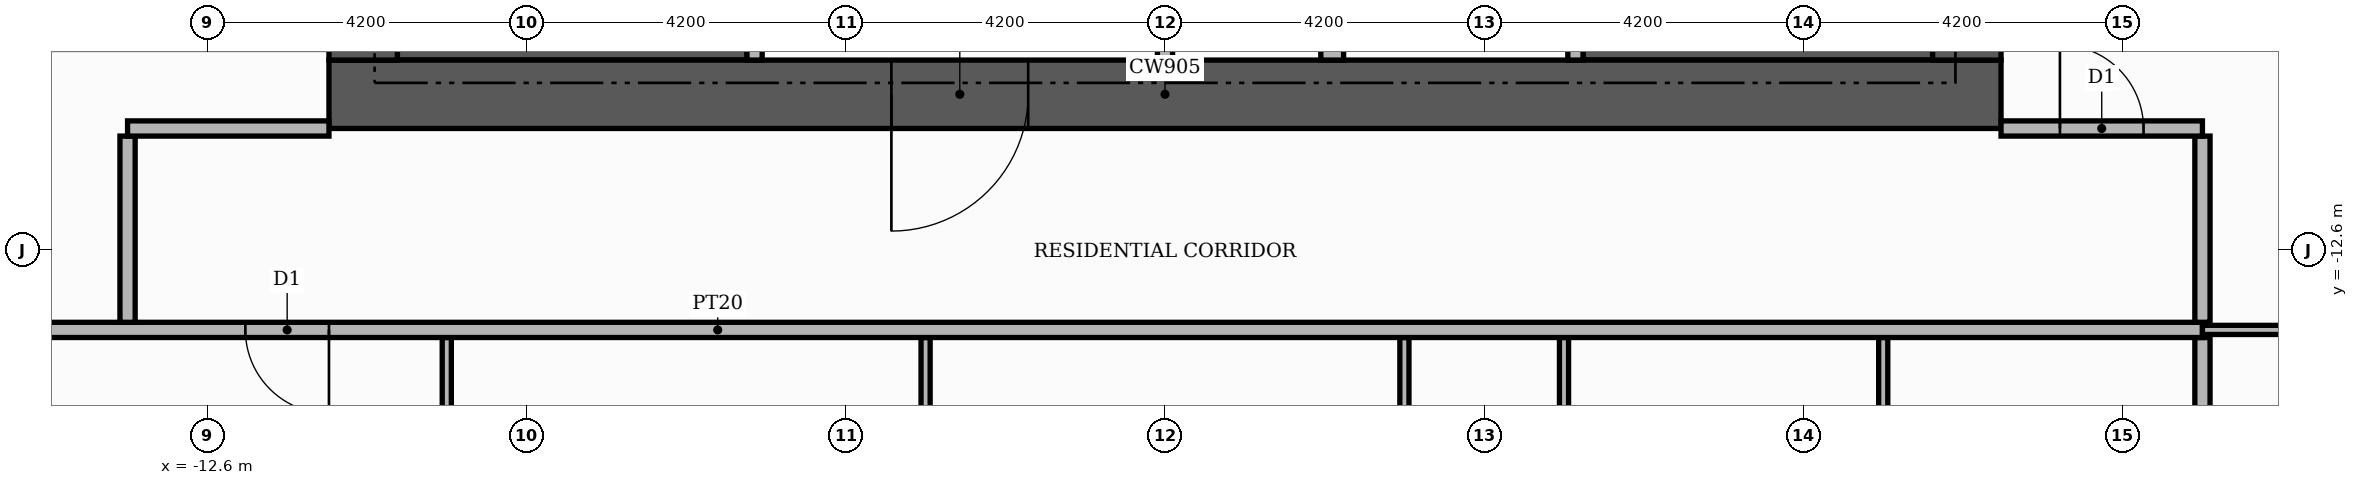
"""IFC4 building model, lengths in metres.
Left out: names, types, materials, properties, quantities, classifications, styles, units other than length and angle.
Written with IfcOpenShell. Run it as: python <this file> out.ifc"""

import sys

from ifc_helpers import new_model, si_unit, direction, frame, frame_2d, origin, place, context, subcontext, project, spatial, rectangle, extrude, element, fill, save


model = new_model("IFC4")
c1 = context("Model", 3, precision=1e-05, world=origin(), true_north=direction((0.0, 1.0)))
c2 = subcontext(c1, "Body", "Model", "MODEL_VIEW")
j1 = project(units=[si_unit("LENGTHUNIT", "METRE"), si_unit("PLANEANGLEUNIT", "RADIAN")], contexts=[c1])
p1 = place(None, origin())
s1 = spatial("IfcSite", under=j1, at=p1, CompositionType="ELEMENT")
p2 = place(p1, origin())
s2 = spatial("IfcBuilding", under=s1, at=p2, CompositionType="ELEMENT")
p3 = place(p2, frame((0.0, 0.0, 244.5)))
s3 = spatial("IfcBuildingStorey", under=s2, at=p3, CompositionType="ELEMENT", Elevation=244.5)
for number, where, z_axis, x_axis in (
    (1, (-10.1, -9.15, 0.0), (0.0, 0.0, 1.0), (1.0, 0.0, 0.0)),
    (2, (5.5, -9.15, 0.0), (0.0, 0.0, 1.0), (1.0, 0.0, 0.0)),
):
    element("IfcWall", number, at=place(p3, frame(where, z_axis=z_axis, x_axis=x_axis)), inside=s3, PredefinedType="SHEAR", context=c2, shape_type="SweptSolid", body=[
        extrude(rectangle(XDim=4.6, YDim=1.9, at=frame_2d((2.3, 0.0))), origin(), (0.0, 0.0, 1.0), 3.48),
    ])
p4 = place(p3, frame((-11.0, -10.55, 0.0), z_axis=(0.0, 0.0, 1.0), x_axis=(1.0, 0.0, 0.0)))
e3 = element("IfcWall", 3, at=p4, inside=s3, PredefinedType="SHEAR", context=c2, shape_type="SweptSolid", body=[
    extrude(rectangle(XDim=22.0, YDim=0.9, at=frame_2d((11.0, 0.0))), origin(), (0.0, 0.0, 1.0), 3.48),
])
p5 = place(p4, frame((7.4, 0.0, 0.0)))
e4 = element("IfcOpeningElement", 4, at=p5, cuts=e3, PredefinedType="OPENING", context=c2, shape_type="SweptSolid", body=[
    extrude(rectangle(XDim=1.8, YDim=2.2, at=frame_2d((0.9, 1.1))), frame((0.0, 0.46, 0.0), z_axis=(0.0, -1.0, 0.0), x_axis=(1.0, 0.0, 0.0)), (0.0, 0.0, 1.0), 0.92),
])
for number, where, z_axis, x_axis in (
    (5, (-10.55, -10.1, 0.0), (0.0, 0.0, 1.0), (0.0, 1.0, 0.0)),
    (6, (10.55, -10.1, 0.0), (0.0, 0.0, 1.0), (0.0, 1.0, 0.0)),
):
    element("IfcWall", number, at=place(p3, frame(where, z_axis=z_axis, x_axis=x_axis)), inside=s3, PredefinedType="SHEAR", context=c2, shape_type="SweptSolid", body=[
        extrude(rectangle(XDim=20.2, YDim=0.9, at=frame_2d((10.1, 0.0))), origin(), (0.0, 0.0, 1.0), 3.48),
    ])
p6 = place(p3, frame((-5.4, -10.1, 0.0), z_axis=(0.0, 0.0, 1.0), x_axis=(0.0, 1.0, 0.0)))
e7 = element("IfcWall", 7, at=p6, inside=s3, PredefinedType="PARTITIONING", context=c2, shape_type="SweptSolid", body=[
    extrude(rectangle(XDim=4.6, YDim=0.2, at=frame_2d((2.3, 0.0))), origin(), (0.0, 0.0, 1.0), 3.48),
])
p7 = place(p6, frame((2.9, 0.0, 0.0)))
e8 = element("IfcOpeningElement", 8, at=p7, cuts=e7, PredefinedType="OPENING", context=c2, shape_type="SweptSolid", body=[
    extrude(rectangle(XDim=1.0, YDim=2.1, at=frame_2d((0.5, 1.05))), frame((0.0, 0.11, 0.0), z_axis=(0.0, -1.0, 0.0), x_axis=(1.0, 0.0, 0.0)), (0.0, 0.0, 1.0), 0.22),
])
p8 = place(p3, frame((0.0, -10.1, 0.0), z_axis=(0.0, 0.0, 1.0), x_axis=(0.0, 1.0, 0.0)))
e9 = element("IfcWall", 9, at=p8, inside=s3, PredefinedType="PARTITIONING", context=c2, shape_type="SweptSolid", body=[
    extrude(rectangle(XDim=2.2, YDim=0.2, at=frame_2d((1.1, 0.0))), origin(), (0.0, 0.0, 1.0), 3.48),
])
p9 = place(p3, frame((2.2, -10.1, 0.0), z_axis=(0.0, 0.0, 1.0), x_axis=(0.0, 1.0, 0.0)))
e10 = element("IfcWall", 10, at=p9, inside=s3, PredefinedType="PARTITIONING", context=c2, shape_type="SweptSolid", body=[
    extrude(rectangle(XDim=2.2, YDim=0.3, at=frame_2d((1.1, 0.0))), origin(), (0.0, 0.0, 1.0), 3.48),
])
p10 = place(p3, frame((5.4, -10.1, 0.0), z_axis=(0.0, 0.0, 1.0), x_axis=(0.0, 1.0, 0.0)))
e11 = element("IfcWall", 11, at=p10, inside=s3, PredefinedType="PARTITIONING", context=c2, shape_type="SweptSolid", body=[
    extrude(rectangle(XDim=4.6, YDim=0.2, at=frame_2d((2.3, 0.0))), origin(), (0.0, 0.0, 1.0), 3.48),
])
p11 = place(p10, frame((2.9, 0.0, 0.0)))
e12 = element("IfcOpeningElement", 12, at=p11, cuts=e11, PredefinedType="OPENING", context=c2, shape_type="SweptSolid", body=[
    extrude(rectangle(XDim=1.0, YDim=2.1, at=frame_2d((0.5, 1.05))), frame((0.0, 0.11, 0.0), z_axis=(0.0, -1.0, 0.0), x_axis=(1.0, 0.0, 0.0)), (0.0, 0.0, 1.0), 0.22),
])
p12 = place(p3, frame((13.65, -25.42, 0.0), z_axis=(0.0, 0.0, 1.0), x_axis=(0.0, 1.0, 0.0)))
e13 = element("IfcWall", 13, at=p12, inside=s3, PredefinedType="PARTITIONING", context=c2, shape_type="SweptSolid", body=[
    extrude(rectangle(XDim=11.67, YDim=0.2, at=frame_2d((5.835, 0.0))), origin(), (0.0, 0.0, 1.0), 3.48),
])
for number, where, z_axis, x_axis in (
    (14, (-9.45, -18.56, 0.0), (0.0, 0.0, 1.0), (0.0, 1.0, 0.0)),
    (15, (-3.15, -18.56, 0.0), (0.0, 0.0, 1.0), (0.0, 1.0, 0.0)),
    (16, (3.15, -18.56, 0.0), (0.0, 0.0, 1.0), (0.0, 1.0, 0.0)),
    (17, (5.25, -18.56, 0.0), (0.0, 0.0, 1.0), (0.0, 1.0, 0.0)),
    (18, (9.45, -18.56, 0.0), (0.0, 0.0, 1.0), (0.0, 1.0, 0.0)),
):
    element("IfcWall", number, at=place(p3, frame(where, z_axis=z_axis, x_axis=x_axis)), inside=s3, PredefinedType="PARTITIONING", context=c2, shape_type="SweptSolid", body=[
        extrude(rectangle(XDim=4.81, YDim=0.12, at=frame_2d((2.405, 0.0))), origin(), (0.0, 0.0, 1.0), 3.48),
    ])
p13 = place(p3, frame((-25.42, -13.65, 0.0), z_axis=(0.0, 0.0, 1.0), x_axis=(1.0, 0.0, 0.0)))
e19 = element("IfcWall", 19, at=p13, inside=s3, PredefinedType="PARTITIONING", context=c2, shape_type="SweptSolid", body=[
    extrude(rectangle(XDim=39.07, YDim=0.2, at=frame_2d((19.535, 0.0))), origin(), (0.0, 0.0, 1.0), 3.48),
])
p14 = place(p13, frame((13.32, 0.0, 0.0)))
e20 = element("IfcOpeningElement", 20, at=p14, cuts=e19, PredefinedType="OPENING", context=c2, shape_type="SweptSolid", body=[
    extrude(rectangle(XDim=1.1, YDim=2.4, at=frame_2d((0.55, 1.2))), frame((0.0, 0.11, 0.0), z_axis=(0.0, -1.0, 0.0), x_axis=(1.0, 0.0, 0.0)), (0.0, 0.0, 1.0), 0.22),
])
p15 = place(p3, frame((13.65, -13.65, 0.0), z_axis=(0.0, 0.0, 1.0), x_axis=(1.0, 0.0, 0.0)))
e21 = element("IfcWall", 21, at=p15, inside=s3, PredefinedType="PARTITIONING", context=c2, shape_type="SweptSolid", body=[
    extrude(rectangle(XDim=7.07, YDim=0.12, at=frame_2d((3.535, 0.0))), origin(), (0.0, 0.0, 1.0), 3.48),
])
p16 = place(p15, frame((3.085, 0.0, 0.0)))
e22 = element("IfcOpeningElement", 22, at=p16, cuts=e21, PredefinedType="OPENING", context=c2, shape_type="SweptSolid", body=[
    extrude(rectangle(XDim=0.9, YDim=2.1, at=frame_2d((0.45, 1.05))), frame((0.0, 0.07, 0.0), z_axis=(0.0, -1.0, 0.0), x_axis=(1.0, 0.0, 0.0)), (0.0, 0.0, 1.0), 0.14),
])
for number, where, z_axis, x_axis in (
    (23, (-13.65, -13.55, 0.0), (0.0, 0.0, 1.0), (0.0, 1.0, 0.0)),
    (24, (13.65, -13.55, 0.0), (0.0, 0.0, 1.0), (0.0, 1.0, 0.0)),
):
    element("IfcWall", number, at=place(p3, frame(where, z_axis=z_axis, x_axis=x_axis)), inside=s3, PredefinedType="PARTITIONING", context=c2, shape_type="SweptSolid", body=[
        extrude(rectangle(XDim=2.45, YDim=0.2, at=frame_2d((1.225, 0.0))), origin(), (0.0, 0.0, 1.0), 3.48),
    ])
p17 = place(p3, frame((-13.65, -11.0, 0.0), z_axis=(0.0, 0.0, 1.0), x_axis=(1.0, 0.0, 0.0)))
e25 = element("IfcWall", 25, at=p17, inside=s3, PredefinedType="PARTITIONING", context=c2, shape_type="SweptSolid", body=[
    extrude(rectangle(XDim=2.65, YDim=0.2, at=frame_2d((1.325, 0.0))), origin(), (0.0, 0.0, 1.0), 3.48),
])
p18 = place(p3, frame((11.0, -11.0, 0.0), z_axis=(0.0, 0.0, 1.0), x_axis=(1.0, 0.0, 0.0)))
e26 = element("IfcWall", 26, at=p18, inside=s3, PredefinedType="PARTITIONING", context=c2, shape_type="SweptSolid", body=[
    extrude(rectangle(XDim=2.65, YDim=0.2, at=frame_2d((1.325, 0.0))), origin(), (0.0, 0.0, 1.0), 3.48),
])
p19 = place(p18, frame((0.775, 0.0, 0.0)))
e27 = element("IfcOpeningElement", 27, at=p19, cuts=e26, PredefinedType="OPENING", context=c2, shape_type="SweptSolid", body=[
    extrude(rectangle(XDim=1.1, YDim=2.4, at=frame_2d((0.55, 1.2))), frame((0.0, 0.11, 0.0), z_axis=(0.0, -1.0, 0.0), x_axis=(1.0, 0.0, 0.0)), (0.0, 0.0, 1.0), 0.22),
])
p20 = place(p5, frame((1.8, 0.0, 0.0), z_axis=(0.0, 0.0, 1.0), x_axis=(-1.0, 0.0, 0.0)))
e28 = element("IfcDoor", 28, at=p20, inside=s3, OperationType="DOUBLE_DOOR_SINGLE_SWING", PredefinedType="DOOR", context=c2, shape_type="SweptSolid", body=[
    extrude(rectangle(XDim=1.8, YDim=2.2, at=frame_2d((0.9, 1.1))), frame((0.0, 0.025, 0.0), z_axis=(0.0, -1.0, 0.0), x_axis=(1.0, 0.0, 0.0)), (0.0, 0.0, 1.0), 0.05),
])
fill(e4, e28)
p21 = place(p14, frame((1.1, 0.0, 0.0), z_axis=(0.0, 0.0, 1.0), x_axis=(-1.0, 0.0, 0.0)))
e29 = element("IfcDoor", 29, at=p21, inside=s3, OperationType="SINGLE_SWING_RIGHT", PredefinedType="DOOR", context=c2, shape_type="SweptSolid", body=[
    extrude(rectangle(XDim=1.1, YDim=2.4, at=frame_2d((0.55, 1.2))), frame((0.0, 0.025, 0.0), z_axis=(0.0, -1.0, 0.0), x_axis=(1.0, 0.0, 0.0)), (0.0, 0.0, 1.0), 0.05),
])
fill(e20, e29)
p22 = place(p19, origin())
e30 = element("IfcDoor", 30, at=p22, inside=s3, OperationType="SINGLE_SWING_LEFT", PredefinedType="DOOR", context=c2, shape_type="SweptSolid", body=[
    extrude(rectangle(XDim=1.1, YDim=2.4, at=frame_2d((0.55, 1.2))), frame((0.0, 0.025, 0.0), z_axis=(0.0, -1.0, 0.0), x_axis=(1.0, 0.0, 0.0)), (0.0, 0.0, 1.0), 0.05),
])
fill(e27, e30)
save(model, sys.argv[1])
